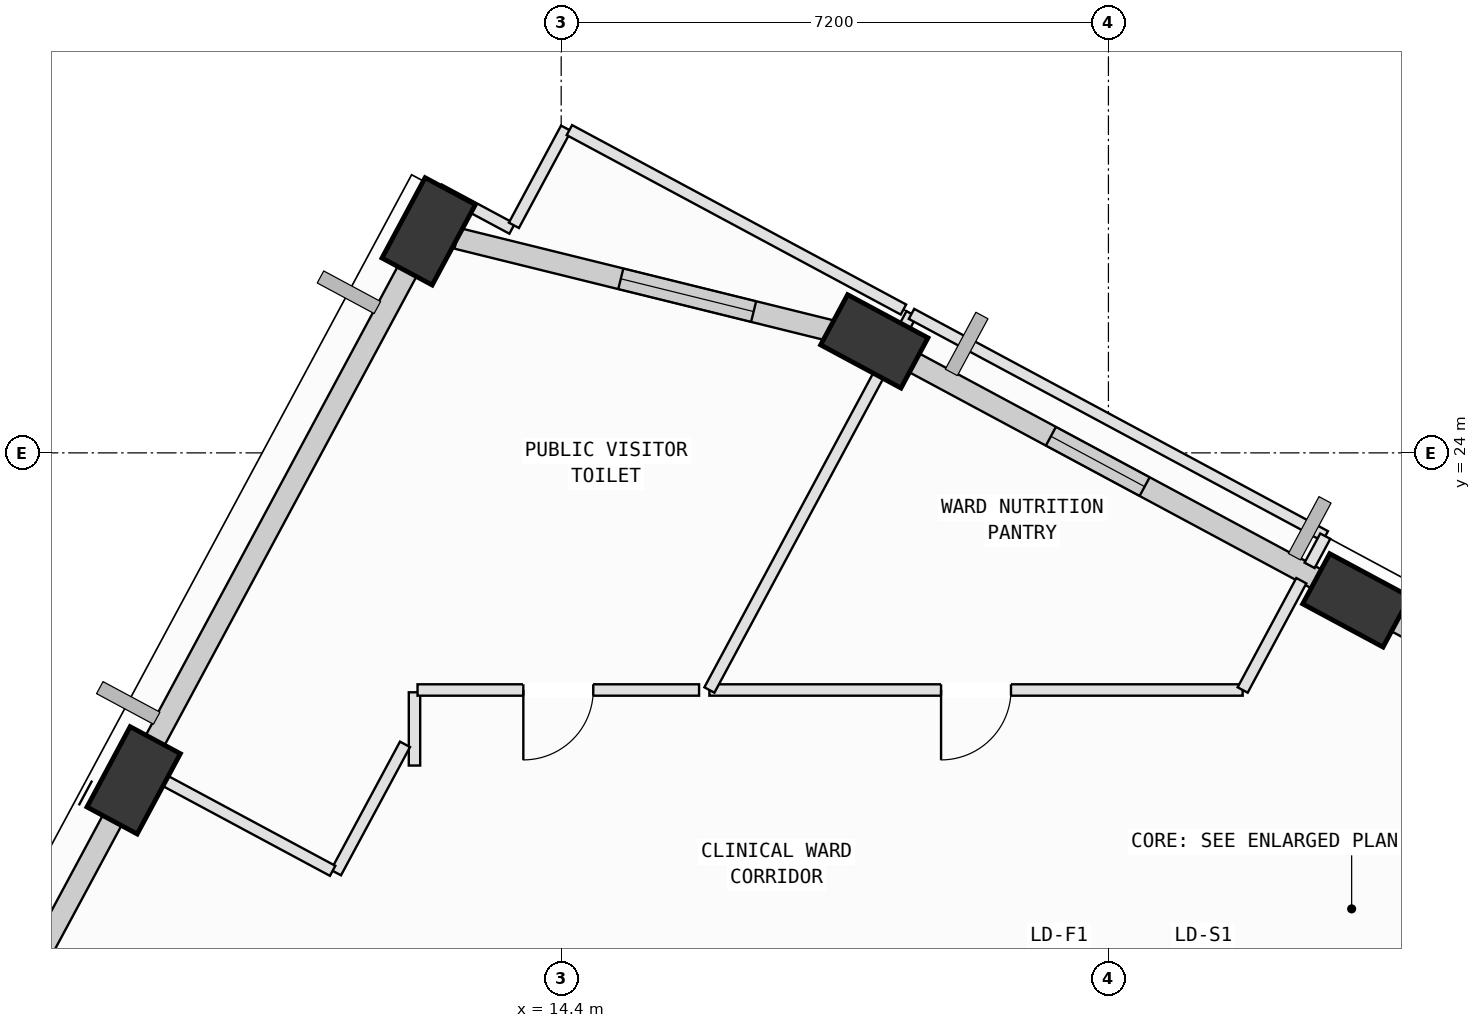
"""IFC4 building model, lengths in metres.
Left out: names, types, materials, properties, quantities, classifications, styles, units other than length and angle.
Written with IfcOpenShell. Run it as: python <this file> out.ifc"""

import sys

from ifc_helpers import new_model, si_unit, direction, frame, frame_2d, origin, origin_2d, place, context, subcontext, project, spatial, rectangle, extrude, element, fill, save


model = new_model("IFC4")
c1 = context("Model", 3, precision=1e-05, world=origin(), true_north=direction((0.0, 1.0)))
c2 = subcontext(c1, "Body", "Model", "MODEL_VIEW")
j1 = project(units=[si_unit("LENGTHUNIT", "METRE"), si_unit("PLANEANGLEUNIT", "RADIAN")], contexts=[c1])
p1 = place(None, origin())
s1 = spatial("IfcSite", under=j1, at=p1, CompositionType="ELEMENT")
p2 = place(p1, origin())
s2 = spatial("IfcBuilding", under=s1, at=p2, CompositionType="ELEMENT")
p3 = place(p2, frame((0.0, 0.0, 288.6)))
s3 = spatial("IfcBuildingStorey", under=s2, at=p3, CompositionType="ELEMENT", Elevation=288.6)
p4 = place(p3, frame((24.862, 22.059, 0.002), z_axis=(0.011660007083, -0.036078870084, 0.999280921147), x_axis=(-0.983654833294, 0.179167776512, 0.017946498203)))
e1 = element("IfcColumn", 1, at=p4, inside=s3, PredefinedType="COLUMN", context=c2, shape_type="SweptSolid", body=[
    extrude(rectangle(XDim=1.2, YDim=0.75, at=origin_2d()), origin(), (0.0, 0.0, 1.0), 3.999),
])
p5 = place(p3, frame((18.52, 25.467, 0.002), z_axis=(-0.002194983084, -0.062435074387, 0.998046613909), x_axis=(-0.863749482382, 0.503053124893, 0.029570005408)))
e2 = element("IfcColumn", 2, at=p5, inside=s3, PredefinedType="COLUMN", context=c2, shape_type="SweptSolid", body=[
    extrude(rectangle(XDim=1.2, YDim=0.75, at=origin_2d()), origin(), (0.0, 0.0, 1.0), 4.004),
])
p6 = place(p3, frame((12.656, 26.915, 0.002), z_axis=(-0.008033507134, -0.086542781403, 0.99621574458), x_axis=(0.552405780626, 0.830051829653, 0.076562481814)))
e3 = element("IfcColumn", 3, at=p6, inside=s3, PredefinedType="COLUMN", context=c2, shape_type="SweptSolid", body=[
    extrude(rectangle(XDim=1.2, YDim=0.75, at=origin_2d()), origin(), (0.0, 0.0, 1.0), 4.011),
])
p7 = place(p3, frame((8.775, 19.691, 0.002), z_axis=(0.021872497794, -0.102132413311, 0.994530323314), x_axis=(0.279366922613, 0.955766050838, 0.092007492169)))
e4 = element("IfcColumn", 4, at=p7, inside=s3, PredefinedType="COLUMN", context=c2, shape_type="SweptSolid", body=[
    extrude(rectangle(XDim=1.2, YDim=0.75, at=origin_2d()), origin(), (0.0, 0.0, 1.0), 4.018),
])
p8 = place(p3, frame((25.257, 21.847, 0.0), z_axis=(0.0, 0.0, 1.0), x_axis=(0.880904495482, -0.473294062756, 0.0)))
e5 = element("IfcWall", 5, at=p8, inside=s3, PredefinedType="SOLIDWALL", context=c2, shape_type="SweptSolid", body=[
    extrude(rectangle(XDim=6.958, YDim=0.28, at=frame_2d((3.479, 0.0))), origin(), (0.0, 0.0, 1.0), 3.165),
])
p9 = place(p3, frame((18.904, 25.261, 0.0), z_axis=(0.0, 0.0, 1.0), x_axis=(0.88088322677, -0.473333646379, 0.0)))
e6 = element("IfcWall", 6, at=p9, inside=s3, PredefinedType="SOLIDWALL", context=c2, shape_type="SweptSolid", body=[
    extrude(rectangle(XDim=6.424, YDim=0.28, at=frame_2d((3.212, 0.0))), origin(), (0.0, 0.0, 1.0), 3.265),
])
p10 = place(p9, frame((2.201, 0.0, 0.75)))
e7 = element("IfcOpeningElement", 7, at=p10, cuts=e6, PredefinedType="OPENING", context=c2, shape_type="SweptSolid", body=[
    extrude(rectangle(XDim=1.4, YDim=1.85, at=frame_2d((0.7, 0.925))), frame((0.0, 0.15, 0.0), z_axis=(0.0, -1.0, 0.0), x_axis=(1.0, 0.0, 0.0)), (0.0, 0.0, 1.0), 0.3),
])
p11 = place(p3, frame((13.029, 26.823, 0.0), z_axis=(0.0, 0.0, 1.0), x_axis=(0.970847941081, -0.23969621461, 0.0)))
e8 = element("IfcWall", 8, at=p11, inside=s3, PredefinedType="SOLIDWALL", context=c2, shape_type="SweptSolid", body=[
    extrude(rectangle(XDim=5.302, YDim=0.28, at=frame_2d((2.651, 0.0))), origin(), (0.0, 0.0, 1.0), 3.265),
])
p12 = place(p11, frame((2.22, 0.0, 0.75)))
e9 = element("IfcOpeningElement", 9, at=p12, cuts=e8, PredefinedType="OPENING", context=c2, shape_type="SweptSolid", body=[
    extrude(rectangle(XDim=1.8, YDim=2.05, at=frame_2d((0.9, 1.025))), frame((0.0, 0.15, 0.0), z_axis=(0.0, -1.0, 0.0), x_axis=(1.0, 0.0, 0.0)), (0.0, 0.0, 1.0), 0.3),
])
p13 = place(p3, frame((8.876, 19.88, 0.0), z_axis=(0.0, 0.0, 1.0), x_axis=(0.47333195551, 0.88088413534, 0.0)))
e10 = element("IfcWall", 10, at=p13, inside=s3, PredefinedType="SOLIDWALL", context=c2, shape_type="SweptSolid", body=[
    extrude(rectangle(XDim=7.434, YDim=0.28, at=frame_2d((3.717, 0.0))), origin(), (0.0, 0.0, 1.0), 3.265),
])
p14 = place(p3, frame((4.98, 12.628, 0.0), z_axis=(0.0, 0.0, 1.0), x_axis=(0.473337134164, 0.880881352636, 0.0)))
e11 = element("IfcWall", 11, at=p14, inside=s3, PredefinedType="SOLIDWALL", context=c2, shape_type="SweptSolid", body=[
    extrude(rectangle(XDim=7.485, YDim=0.28, at=frame_2d((3.742, 0.0))), origin(), (0.0, 0.0, 1.0), 3.265),
])
p15 = place(p3, frame((23.366, 20.88, 0.0), z_axis=(0.0, 0.0, 1.0), x_axis=(-1.0, 0.0, 0.0)))
e12 = element("IfcWall", 12, at=p15, inside=s3, PredefinedType="PARTITIONING", context=c2, shape_type="SweptSolid", body=[
    extrude(rectangle(XDim=7.016, YDim=0.15, at=frame_2d((3.508, 0.0))), origin(), (0.0, 0.0, 1.0), 3.415),
])
p16 = place(p15, frame((3.048, 0.0, 0.0)))
e13 = element("IfcOpeningElement", 13, at=p16, cuts=e12, PredefinedType="OPENING", context=c2, shape_type="SweptSolid", body=[
    extrude(rectangle(XDim=0.92, YDim=2.1, at=frame_2d((0.46, 1.05))), frame((0.0, 0.085, 0.0), z_axis=(0.0, -1.0, 0.0), x_axis=(1.0, 0.0, 0.0)), (0.0, 0.0, 1.0), 0.17),
])
p17 = place(p3, frame((16.35, 20.88, 0.0), z_axis=(0.0, 0.0, 1.0), x_axis=(0.47326778816, 0.880918611842, 0.0)))
e14 = element("IfcWall", 14, at=p17, inside=s3, PredefinedType="PARTITIONING", context=c2, shape_type="SweptSolid", body=[
    extrude(rectangle(XDim=5.618, YDim=0.15, at=frame_2d((2.809, 0.0))), origin(), (0.0, 0.0, 1.0), 3.78),
])
p18 = place(p3, frame((19.009, 25.829, 0.0), z_axis=(0.0, 0.0, 1.0), x_axis=(0.880893169111, -0.473315143022, 0.0)))
e15 = element("IfcWall", 15, at=p18, inside=s3, PredefinedType="PARTITIONING", context=c2, shape_type="SweptSolid", body=[
    extrude(rectangle(XDim=6.18, YDim=0.15, at=frame_2d((3.09, 0.0))), origin(), (0.0, 0.0, 1.0), 3.78),
])
p19 = place(p3, frame((24.453, 22.904, 0.0), z_axis=(0.0, 0.0, 1.0), x_axis=(-0.472361351168, -0.881404988597, 0.0)))
e16 = element("IfcWall", 16, at=p19, inside=s3, PredefinedType="PARTITIONING", context=c2, shape_type="SweptSolid", body=[
    extrude(rectangle(XDim=0.436, YDim=0.15, at=frame_2d((0.218, 0.0))), origin(), (0.0, 0.0, 1.0), 3.78),
])
p20 = place(p3, frame((24.138, 22.318, 0.0), z_axis=(0.0, 0.0, 1.0), x_axis=(-0.472930998807, -0.881099466784, 0.0)))
e17 = element("IfcWall", 17, at=p20, inside=s3, PredefinedType="PARTITIONING", context=c2, shape_type="SweptSolid", body=[
    extrude(rectangle(XDim=1.632, YDim=0.15, at=frame_2d((0.816, 0.0))), origin(), (0.0, 0.0, 1.0), 3.78),
])
p21 = place(p3, frame((12.47, 20.85, 0.0), z_axis=(0.0, 0.0, 1.0), x_axis=(0.0, -1.0, 0.0)))
e18 = element("IfcWall", 18, at=p21, inside=s3, PredefinedType="PARTITIONING", context=c2, shape_type="SweptSolid", body=[
    extrude(rectangle(XDim=0.964, YDim=0.15, at=frame_2d((0.482, 0.0))), origin(), (0.0, 0.0, 1.0), 3.415),
])
p22 = place(p3, frame((12.345, 20.165, 0.0), z_axis=(0.0, 0.0, 1.0), x_axis=(-0.47371238965, -0.880679607969, 0.0)))
e19 = element("IfcWall", 19, at=p22, inside=s3, PredefinedType="PARTITIONING", context=c2, shape_type="SweptSolid", body=[
    extrude(rectangle(XDim=1.917, YDim=0.15, at=frame_2d((0.958, 0.0))), origin(), (0.0, 0.0, 1.0), 3.415),
])
p23 = place(p3, frame((11.393, 18.501, 0.0), z_axis=(0.0, 0.0, 1.0), x_axis=(-0.880919921117, 0.473265351128, 0.0)))
e20 = element("IfcWall", 20, at=p23, inside=s3, PredefinedType="PARTITIONING", context=c2, shape_type="SweptSolid", body=[
    extrude(rectangle(XDim=2.757, YDim=0.15, at=frame_2d((1.379, 0.0))), origin(), (0.0, 0.0, 1.0), 3.78),
])
p24 = place(p3, frame((12.227, 26.518, 0.0), z_axis=(0.0, 0.0, 1.0), x_axis=(0.473505400145, 0.880790915049, 0.0)))
e21 = element("IfcWall", 21, at=p24, inside=s3, PredefinedType="PARTITIONING", context=c2, shape_type="SweptSolid", body=[
    extrude(rectangle(XDim=1.102, YDim=0.15, at=frame_2d((0.551, 0.0))), origin(), (0.0, 0.0, 1.0), 3.265),
])
p25 = place(p3, frame((12.793, 27.465, 0.0), z_axis=(0.0, 0.0, 1.0), x_axis=(0.881346781722, -0.472469946502, 0.0)))
e22 = element("IfcWall", 22, at=p25, inside=s3, PredefinedType="PARTITIONING", context=c2, shape_type="SweptSolid", body=[
    extrude(rectangle(XDim=1.09, YDim=0.15, at=frame_2d((0.545, 0.0))), origin(), (0.0, 0.0, 1.0), 3.78),
])
p26 = place(p3, frame((13.778, 26.994, 0.0), z_axis=(0.0, 0.0, 1.0), x_axis=(0.473225877658, 0.880941126702, 0.0)))
e23 = element("IfcWall", 23, at=p26, inside=s3, PredefinedType="PARTITIONING", context=c2, shape_type="SweptSolid", body=[
    extrude(rectangle(XDim=1.45, YDim=0.15, at=frame_2d((0.725, 0.0))), origin(), (0.0, 0.0, 1.0), 3.78),
])
p27 = place(p3, frame((14.508, 28.247, 0.0), z_axis=(0.0, 0.0, 1.0), x_axis=(0.880927940895, -0.473250423086, 0.0)))
e24 = element("IfcWall", 24, at=p27, inside=s3, PredefinedType="PARTITIONING", context=c2, shape_type="SweptSolid", body=[
    extrude(rectangle(XDim=4.989, YDim=0.15, at=frame_2d((2.495, 0.0))), origin(), (0.0, 0.0, 1.0), 3.78),
])
p28 = place(p3, frame((16.214, 20.88, 0.0), z_axis=(0.0, 0.0, 1.0), x_axis=(-1.0, 0.0, 0.0)))
e25 = element("IfcWall", 25, at=p28, inside=s3, PredefinedType="PARTITIONING", context=c2, shape_type="SweptSolid", body=[
    extrude(rectangle(XDim=3.704, YDim=0.15, at=frame_2d((1.852, 0.0))), origin(), (0.0, 0.0, 1.0), 3.415),
])
p29 = place(p28, frame((1.392, 0.0, 0.0)))
e26 = element("IfcOpeningElement", 26, at=p29, cuts=e25, PredefinedType="OPENING", context=c2, shape_type="SweptSolid", body=[
    extrude(rectangle(XDim=0.92, YDim=2.1, at=frame_2d((0.46, 1.05))), frame((0.0, 0.085, 0.0), z_axis=(0.0, -1.0, 0.0), x_axis=(1.0, 0.0, 0.0)), (0.0, 0.0, 1.0), 0.17),
])
p30 = place(p10, origin())
e27 = element("IfcWindow", 27, at=p30, inside=s3, PartitioningType="SINGLE_PANEL", PredefinedType="WINDOW", context=c2, shape_type="SweptSolid", body=[
    extrude(rectangle(XDim=1.4, YDim=1.85, at=frame_2d((0.7, 0.925))), frame((0.0, 0.03, 0.0), z_axis=(0.0, -1.0, 0.0), x_axis=(1.0, 0.0, 0.0)), (0.0, 0.0, 1.0), 0.06),
])
fill(e7, e27)
p31 = place(p12, origin())
e28 = element("IfcWindow", 28, at=p31, inside=s3, PartitioningType="SINGLE_PANEL", PredefinedType="WINDOW", context=c2, shape_type="SweptSolid", body=[
    extrude(rectangle(XDim=1.8, YDim=2.05, at=frame_2d((0.9, 1.025))), frame((0.0, 0.03, 0.0), z_axis=(0.0, -1.0, 0.0), x_axis=(1.0, 0.0, 0.0)), (0.0, 0.0, 1.0), 0.06),
])
fill(e9, e28)
p32 = place(p16, origin())
e29 = element("IfcDoor", 29, at=p32, inside=s3, OperationType="SINGLE_SWING_RIGHT", PredefinedType="DOOR", context=c2, shape_type="SweptSolid", body=[
    extrude(rectangle(XDim=0.92, YDim=2.1, at=frame_2d((0.46, 1.05))), frame((0.0, 0.025, 0.0), z_axis=(0.0, -1.0, 0.0), x_axis=(1.0, 0.0, 0.0)), (0.0, 0.0, 1.0), 0.05),
])
fill(e13, e29)
p33 = place(p29, origin())
e30 = element("IfcDoor", 30, at=p33, inside=s3, OperationType="SINGLE_SWING_RIGHT", PredefinedType="DOOR", context=c2, shape_type="SweptSolid", body=[
    extrude(rectangle(XDim=0.92, YDim=2.1, at=frame_2d((0.46, 1.05))), frame((0.0, 0.025, 0.0), z_axis=(0.0, -1.0, 0.0), x_axis=(1.0, 0.0, 0.0)), (0.0, 0.0, 1.0), 0.05),
])
fill(e26, e30)
save(model, sys.argv[1])
